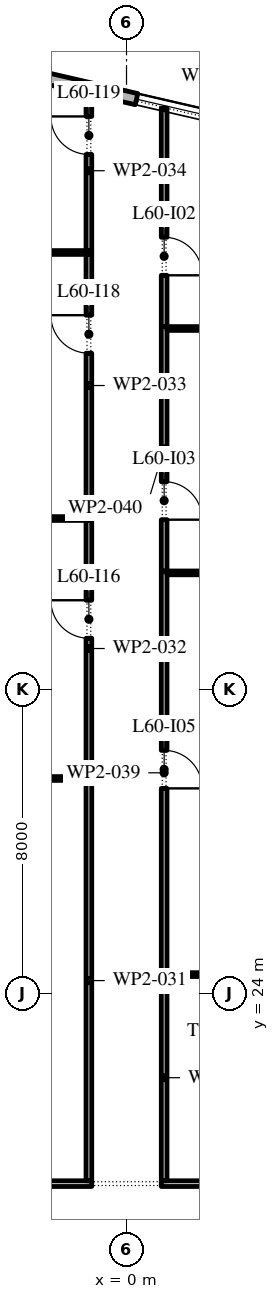
"""IFC4 building model, lengths in metres.
Left out: names, types, materials, properties, quantities, classifications, styles, units other than length and angle.
Written with IfcOpenShell. Run it as: python <this file> out.ifc"""

import sys

from ifc_helpers import new_model, si_unit, direction, frame, frame_2d, origin, place, context, subcontext, project, spatial, rectangle, extrude, element, fill, save


model = new_model("IFC4")
c1 = context("Model", 3, precision=1e-05, world=origin(), true_north=direction((0.0, 1.0)))
c2 = subcontext(c1, "Body", "Model", "MODEL_VIEW")
j1 = project(units=[si_unit("LENGTHUNIT", "METRE"), si_unit("PLANEANGLEUNIT", "RADIAN")], contexts=[c1])
p1 = place(None, origin())
s1 = spatial("IfcSite", under=j1, at=p1, CompositionType="ELEMENT")
p2 = place(p1, origin())
s2 = spatial("IfcBuilding", under=s1, at=p2, CompositionType="ELEMENT")
p3 = place(p2, frame((0.0, 0.0, 276.6)))
s3 = spatial("IfcBuildingStorey", under=s2, at=p3, CompositionType="ELEMENT", Elevation=276.6)
p4 = place(p3, frame((29.616, 40.758, 0.0), z_axis=(0.0, 0.0, 1.0), x_axis=(-0.974370532314, 0.224949029246, 0.0)))
e1 = element("IfcWall", 1, at=p4, inside=s3, PredefinedType="STANDARD", context=c2, shape_type="SweptSolid", body=[
    extrude(rectangle(XDim=48.0, YDim=0.3, at=frame_2d((24.0, 0.0))), origin(), (0.0, 0.0, 1.0), 4.0),
])
p5 = place(p4, frame((1.625, 0.0, 0.45)))
e2 = element("IfcOpeningElement", 2, at=p5, cuts=e1, PredefinedType="OPENING", context=c2, shape_type="SweptSolid", body=[
    extrude(rectangle(XDim=4.5, YDim=2.575, at=frame_2d((2.25, 1.288))), frame((0.0, 0.16, 0.0), z_axis=(0.0, -1.0, 0.0), x_axis=(1.0, 0.0, 0.0)), (0.0, 0.0, 1.0), 0.32),
])
p6 = place(p4, frame((10.575, 0.0, 0.0)))
e3 = element("IfcOpeningElement", 3, at=p6, cuts=e1, PredefinedType="OPENING", context=c2, shape_type="SweptSolid", body=[
    extrude(rectangle(XDim=2.4, YDim=3.5, at=frame_2d((1.2, 1.75))), frame((0.0, 0.16, 0.0), z_axis=(0.0, -1.0, 0.0), x_axis=(1.0, 0.0, 0.0)), (0.0, 0.0, 1.0), 0.32),
])
p7 = place(p4, frame((17.575, 0.0, 0.45)))
e4 = element("IfcOpeningElement", 4, at=p7, cuts=e1, PredefinedType="OPENING", context=c2, shape_type="SweptSolid", body=[
    extrude(rectangle(XDim=4.5, YDim=2.45, at=frame_2d((2.25, 1.225))), frame((0.0, 0.16, 0.0), z_axis=(0.0, -1.0, 0.0), x_axis=(1.0, 0.0, 0.0)), (0.0, 0.0, 1.0), 0.32),
])
p8 = place(p4, frame((25.625, 0.0, 0.45)))
e5 = element("IfcOpeningElement", 5, at=p8, cuts=e1, PredefinedType="OPENING", context=c2, shape_type="SweptSolid", body=[
    extrude(rectangle(XDim=4.5, YDim=2.45, at=frame_2d((2.25, 1.225))), frame((0.0, 0.16, 0.0), z_axis=(0.0, -1.0, 0.0), x_axis=(1.0, 0.0, 0.0)), (0.0, 0.0, 1.0), 0.32),
])
p9 = place(p4, frame((33.675, 0.0, 0.45)))
e6 = element("IfcOpeningElement", 6, at=p9, cuts=e1, PredefinedType="OPENING", context=c2, shape_type="SweptSolid", body=[
    extrude(rectangle(XDim=4.5, YDim=2.45, at=frame_2d((2.25, 1.225))), frame((0.0, 0.16, 0.0), z_axis=(0.0, -1.0, 0.0), x_axis=(1.0, 0.0, 0.0)), (0.0, 0.0, 1.0), 0.32),
])
p10 = place(p4, frame((42.175, 0.0, 0.0)))
e7 = element("IfcOpeningElement", 7, at=p10, cuts=e1, PredefinedType="OPENING", context=c2, shape_type="SweptSolid", body=[
    extrude(rectangle(XDim=2.4, YDim=3.5, at=frame_2d((1.2, 1.75))), frame((0.0, 0.16, 0.0), z_axis=(0.0, -1.0, 0.0), x_axis=(1.0, 0.0, 0.0)), (0.0, 0.0, 1.0), 0.32),
])
p11 = place(p3, frame((-8.275, 19.0, 0.0), z_axis=(0.0, 0.0, 1.0), x_axis=(1.0, 0.0, 0.0)))
e8 = element("IfcWall", 8, at=p11, inside=s3, PredefinedType="PARTITIONING", context=c2, shape_type="SweptSolid", body=[
    extrude(rectangle(XDim=7.36, YDim=0.15, at=frame_2d((3.68, 0.0))), origin(), (0.0, 0.0, 1.0), 4.0),
])
p12 = place(p3, frame((-8.125, 29.66, 0.0), z_axis=(0.0, 0.0, 1.0), x_axis=(1.0, 0.0, 0.0)))
e9 = element("IfcWall", 9, at=p12, inside=s3, PredefinedType="PARTITIONING", context=c2, shape_type="SweptSolid", body=[
    extrude(rectangle(XDim=7.21, YDim=0.1, at=frame_2d((3.605, 0.0))), origin(), (0.0, 0.0, 1.0), 4.0),
])
p13 = place(p3, frame((-5.95, 36.5, 0.0), z_axis=(0.0, 0.0, 1.0), x_axis=(1.0, 0.0, 0.0)))
e10 = element("IfcWall", 10, at=p13, inside=s3, PredefinedType="PARTITIONING", context=c2, shape_type="SweptSolid", body=[
    extrude(rectangle(XDim=5.035, YDim=0.1, at=frame_2d((2.518, 0.0))), origin(), (0.0, 0.0, 1.0), 4.0),
])
p14 = place(p3, frame((-6.0, 43.5, 0.0), z_axis=(0.0, 0.0, 1.0), x_axis=(1.0, 0.0, 0.0)))
e11 = element("IfcWall", 11, at=p14, inside=s3, PredefinedType="PARTITIONING", context=c2, shape_type="SweptSolid", body=[
    extrude(rectangle(XDim=5.085, YDim=0.1, at=frame_2d((2.542, 0.0))), origin(), (0.0, 0.0, 1.0), 4.0),
])
p15 = place(p3, frame((-0.99, 19.075, 0.0), z_axis=(0.0, 0.0, 1.0), x_axis=(0.0, 1.0, 0.0)))
e12 = element("IfcWall", 12, at=p15, inside=s3, PredefinedType="PARTITIONING", context=c2, shape_type="SweptSolid", body=[
    extrude(rectangle(XDim=10.535, YDim=0.15, at=frame_2d((5.268, 0.0))), origin(), (0.0, 0.0, 1.0), 4.0),
])
p16 = place(p3, frame((-0.99, 29.71, 0.0), z_axis=(0.0, 0.0, 1.0), x_axis=(0.0, 1.0, 0.0)))
e13 = element("IfcWall", 13, at=p16, inside=s3, PredefinedType="PARTITIONING", context=c2, shape_type="SweptSolid", body=[
    extrude(rectangle(XDim=6.74, YDim=0.15, at=frame_2d((3.37, 0.0))), origin(), (0.0, 0.0, 1.0), 4.0),
])
p17 = place(p16, frame((3.64, 0.0, 0.0)))
e14 = element("IfcOpeningElement", 14, at=p17, cuts=e13, PredefinedType="OPENING", context=c2, shape_type="SweptSolid", body=[
    extrude(rectangle(XDim=1.0, YDim=2.1, at=frame_2d((0.5, 1.05))), frame((0.0, 0.085, 0.0), z_axis=(0.0, -1.0, 0.0), x_axis=(1.0, 0.0, 0.0)), (0.0, 0.0, 1.0), 0.17),
])
p18 = place(p3, frame((-0.99, 36.55, 0.0), z_axis=(0.0, 0.0, 1.0), x_axis=(0.0, 1.0, 0.0)))
e15 = element("IfcWall", 15, at=p18, inside=s3, PredefinedType="PARTITIONING", context=c2, shape_type="SweptSolid", body=[
    extrude(rectangle(XDim=6.9, YDim=0.15, at=frame_2d((3.45, 0.0))), origin(), (0.0, 0.0, 1.0), 4.0),
])
p19 = place(p18, frame((4.3, 0.0, 0.0)))
e16 = element("IfcOpeningElement", 16, at=p19, cuts=e15, PredefinedType="OPENING", context=c2, shape_type="SweptSolid", body=[
    extrude(rectangle(XDim=1.0, YDim=2.1, at=frame_2d((0.5, 1.05))), frame((0.0, 0.085, 0.0), z_axis=(0.0, -1.0, 0.0), x_axis=(1.0, 0.0, 0.0)), (0.0, 0.0, 1.0), 0.17),
])
p20 = place(p3, frame((-0.99, 43.55, 0.0), z_axis=(0.0, 0.0, 1.0), x_axis=(0.0, 1.0, 0.0)))
e17 = element("IfcWall", 17, at=p20, inside=s3, PredefinedType="PARTITIONING", context=c2, shape_type="SweptSolid", body=[
    extrude(rectangle(XDim=4.203, YDim=0.15, at=frame_2d((2.102, 0.0))), origin(), (0.0, 0.0, 1.0), 4.0),
])
p21 = place(p20, frame((2.53, 0.0, 0.0)))
e18 = element("IfcOpeningElement", 18, at=p21, cuts=e17, PredefinedType="OPENING", context=c2, shape_type="SweptSolid", body=[
    extrude(rectangle(XDim=1.0, YDim=2.1, at=frame_2d((0.5, 1.05))), frame((0.0, 0.085, 0.0), z_axis=(0.0, -1.0, 0.0), x_axis=(1.0, 0.0, 0.0)), (0.0, 0.0, 1.0), 0.17),
])
p22 = place(p3, frame((0.915, 19.0, 0.0), z_axis=(0.0, 0.0, 1.0), x_axis=(1.0, 0.0, 0.0)))
e19 = element("IfcWall", 19, at=p22, inside=s3, PredefinedType="PARTITIONING", context=c2, shape_type="SweptSolid", body=[
    extrude(rectangle(XDim=7.36, YDim=0.15, at=frame_2d((3.68, 0.0))), origin(), (0.0, 0.0, 1.0), 4.0),
])
p23 = place(p22, frame((4.635, 0.0, 0.0)))
e20 = element("IfcOpeningElement", 20, at=p23, cuts=e19, PredefinedType="OPENING", context=c2, shape_type="SweptSolid", body=[
    extrude(rectangle(XDim=1.0, YDim=2.1, at=frame_2d((0.5, 1.05))), frame((0.0, 0.085, 0.0), z_axis=(0.0, -1.0, 0.0), x_axis=(1.0, 0.0, 0.0)), (0.0, 0.0, 1.0), 0.17),
])
p24 = place(p3, frame((0.99, 24.5, 0.0), z_axis=(0.0, 0.0, 1.0), x_axis=(0.0, -1.0, 0.0)))
e21 = element("IfcWall", 21, at=p24, inside=s3, PredefinedType="PARTITIONING", context=c2, shape_type="SweptSolid", body=[
    extrude(rectangle(XDim=5.425, YDim=0.15, at=frame_2d((2.712, 0.0))), origin(), (0.0, 0.0, 1.0), 4.0),
])
p25 = place(p3, frame((1.065, 24.5, 0.0), z_axis=(0.0, 0.0, 1.0), x_axis=(1.0, 0.0, 0.0)))
e22 = element("IfcWall", 22, at=p25, inside=s3, PredefinedType="PARTITIONING", context=c2, shape_type="SweptSolid", body=[
    extrude(rectangle(XDim=7.21, YDim=0.1, at=frame_2d((3.605, 0.0))), origin(), (0.0, 0.0, 1.0), 4.0),
])
p26 = place(p3, frame((0.99, 35.12, 0.0), z_axis=(0.0, 0.0, 1.0), x_axis=(0.0, -1.0, 0.0)))
e23 = element("IfcWall", 23, at=p26, inside=s3, PredefinedType="PARTITIONING", context=c2, shape_type="SweptSolid", body=[
    extrude(rectangle(XDim=10.62, YDim=0.15, at=frame_2d((5.31, 0.0))), origin(), (0.0, 0.0, 1.0), 4.0),
])
p27 = place(p26, frame((4.72, 0.0, 0.0)))
e24 = element("IfcOpeningElement", 24, at=p27, cuts=e23, PredefinedType="OPENING", context=c2, shape_type="SweptSolid", body=[
    extrude(rectangle(XDim=1.0, YDim=2.1, at=frame_2d((0.5, 1.05))), frame((0.0, 0.085, 0.0), z_axis=(0.0, -1.0, 0.0), x_axis=(1.0, 0.0, 0.0)), (0.0, 0.0, 1.0), 0.17),
])
p28 = place(p3, frame((0.99, 41.55, 0.0), z_axis=(0.0, 0.0, 1.0), x_axis=(0.0, -1.0, 0.0)))
e25 = element("IfcWall", 25, at=p28, inside=s3, PredefinedType="PARTITIONING", context=c2, shape_type="SweptSolid", body=[
    extrude(rectangle(XDim=6.43, YDim=0.15, at=frame_2d((3.215, 0.0))), origin(), (0.0, 0.0, 1.0), 4.0),
])
p29 = place(p28, frame((4.08, 0.0, 0.0)))
e26 = element("IfcOpeningElement", 26, at=p29, cuts=e25, PredefinedType="OPENING", context=c2, shape_type="SweptSolid", body=[
    extrude(rectangle(XDim=1.0, YDim=2.1, at=frame_2d((0.5, 1.05))), frame((0.0, 0.085, 0.0), z_axis=(0.0, -1.0, 0.0), x_axis=(1.0, 0.0, 0.0)), (0.0, 0.0, 1.0), 0.17),
])
p30 = place(p3, frame((0.99, 47.296, 0.0), z_axis=(0.0, 0.0, 1.0), x_axis=(0.0, -1.0, 0.0)))
e27 = element("IfcWall", 27, at=p30, inside=s3, PredefinedType="PARTITIONING", context=c2, shape_type="SweptSolid", body=[
    extrude(rectangle(XDim=5.746, YDim=0.15, at=frame_2d((2.873, 0.0))), origin(), (0.0, 0.0, 1.0), 4.0),
])
p31 = place(p30, frame((3.396, 0.0, 0.0)))
e28 = element("IfcOpeningElement", 28, at=p31, cuts=e27, PredefinedType="OPENING", context=c2, shape_type="SweptSolid", body=[
    extrude(rectangle(XDim=1.0, YDim=2.1, at=frame_2d((0.5, 1.05))), frame((0.0, 0.085, 0.0), z_axis=(0.0, -1.0, 0.0), x_axis=(1.0, 0.0, 0.0)), (0.0, 0.0, 1.0), 0.17),
])
p32 = place(p3, frame((9.39, 35.07, 0.0), z_axis=(0.0, 0.0, 1.0), x_axis=(-1.0, 0.0, 0.0)))
e29 = element("IfcWall", 29, at=p32, inside=s3, PredefinedType="PARTITIONING", context=c2, shape_type="SweptSolid", body=[
    extrude(rectangle(XDim=8.325, YDim=0.1, at=frame_2d((4.163, 0.0))), origin(), (0.0, 0.0, 1.0), 4.0),
])
p33 = place(p3, frame((9.29, 41.5, 0.0), z_axis=(0.0, 0.0, 1.0), x_axis=(-1.0, 0.0, 0.0)))
e30 = element("IfcWall", 30, at=p33, inside=s3, PredefinedType="PARTITIONING", context=c2, shape_type="SweptSolid", body=[
    extrude(rectangle(XDim=8.225, YDim=0.1, at=frame_2d((4.113, 0.0))), origin(), (0.0, 0.0, 1.0), 4.0),
])
p34 = place(p8, origin())
e31 = element("IfcWindow", 31, at=p34, inside=s3, PartitioningType="DOUBLE_PANEL_VERTICAL", PredefinedType="WINDOW", context=c2, shape_type="SweptSolid", body=[
    extrude(rectangle(XDim=4.5, YDim=2.45, at=frame_2d((2.25, 1.225))), frame((0.0, 0.03, 0.0), z_axis=(0.0, -1.0, 0.0), x_axis=(1.0, 0.0, 0.0)), (0.0, 0.0, 1.0), 0.06),
])
fill(e5, e31)
p35 = place(p31, origin())
e32 = element("IfcDoor", 32, at=p35, inside=s3, OperationType="SINGLE_SWING_LEFT", PredefinedType="DOOR", context=c2, shape_type="SweptSolid", body=[
    extrude(rectangle(XDim=1.0, YDim=2.1, at=frame_2d((0.5, 1.05))), frame((0.0, 0.025, 0.0), z_axis=(0.0, -1.0, 0.0), x_axis=(1.0, 0.0, 0.0)), (0.0, 0.0, 1.0), 0.05),
])
fill(e28, e32)
p36 = place(p29, origin())
e33 = element("IfcDoor", 33, at=p36, inside=s3, OperationType="SINGLE_SWING_LEFT", PredefinedType="DOOR", context=c2, shape_type="SweptSolid", body=[
    extrude(rectangle(XDim=1.0, YDim=2.1, at=frame_2d((0.5, 1.05))), frame((0.0, 0.025, 0.0), z_axis=(0.0, -1.0, 0.0), x_axis=(1.0, 0.0, 0.0)), (0.0, 0.0, 1.0), 0.05),
])
fill(e26, e33)
p37 = place(p27, origin())
e34 = element("IfcDoor", 34, at=p37, inside=s3, OperationType="SINGLE_SWING_LEFT", PredefinedType="DOOR", context=c2, shape_type="SweptSolid", body=[
    extrude(rectangle(XDim=1.0, YDim=2.1, at=frame_2d((0.5, 1.05))), frame((0.0, 0.025, 0.0), z_axis=(0.0, -1.0, 0.0), x_axis=(1.0, 0.0, 0.0)), (0.0, 0.0, 1.0), 0.05),
])
fill(e24, e34)
p38 = place(p17, origin())
e35 = element("IfcDoor", 35, at=p38, inside=s3, OperationType="SINGLE_SWING_LEFT", PredefinedType="DOOR", context=c2, shape_type="SweptSolid", body=[
    extrude(rectangle(XDim=1.0, YDim=2.1, at=frame_2d((0.5, 1.05))), frame((0.0, 0.025, 0.0), z_axis=(0.0, -1.0, 0.0), x_axis=(1.0, 0.0, 0.0)), (0.0, 0.0, 1.0), 0.05),
])
fill(e14, e35)
p39 = place(p19, origin())
e36 = element("IfcDoor", 36, at=p39, inside=s3, OperationType="SINGLE_SWING_LEFT", PredefinedType="DOOR", context=c2, shape_type="SweptSolid", body=[
    extrude(rectangle(XDim=1.0, YDim=2.1, at=frame_2d((0.5, 1.05))), frame((0.0, 0.025, 0.0), z_axis=(0.0, -1.0, 0.0), x_axis=(1.0, 0.0, 0.0)), (0.0, 0.0, 1.0), 0.05),
])
fill(e16, e36)
p40 = place(p21, origin())
e37 = element("IfcDoor", 37, at=p40, inside=s3, OperationType="SINGLE_SWING_LEFT", PredefinedType="DOOR", context=c2, shape_type="SweptSolid", body=[
    extrude(rectangle(XDim=1.0, YDim=2.1, at=frame_2d((0.5, 1.05))), frame((0.0, 0.025, 0.0), z_axis=(0.0, -1.0, 0.0), x_axis=(1.0, 0.0, 0.0)), (0.0, 0.0, 1.0), 0.05),
])
fill(e18, e37)
save(model, sys.argv[1])
